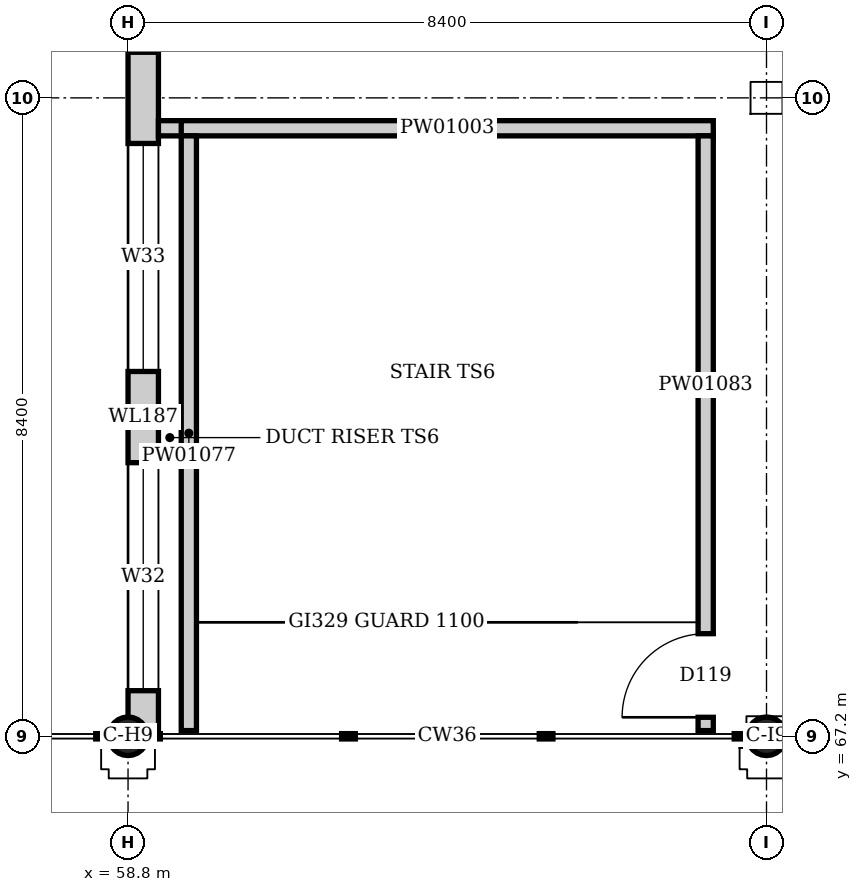
"""IFC4 building model, lengths in metres.
Left out: names, types, materials, properties, quantities, classifications, styles, units other than length and angle.
Written with IfcOpenShell. Run it as: python <this file> out.ifc"""

import sys

from ifc_helpers import new_model, si_unit, direction, frame, frame_2d, origin, origin_2d, place, context, subcontext, project, spatial, rectangle, hollow_circle, extrude, element, fill, save


model = new_model("IFC4")
c1 = context("Model", 3, precision=1e-05, world=origin(), true_north=direction((0.0, 1.0)))
c2 = subcontext(c1, "Body", "Model", "MODEL_VIEW")
j1 = project(units=[si_unit("LENGTHUNIT", "METRE"), si_unit("PLANEANGLEUNIT", "RADIAN")], contexts=[c1])
p1 = place(None, origin())
s1 = spatial("IfcSite", under=j1, at=p1, CompositionType="ELEMENT")
p2 = place(p1, origin())
s2 = spatial("IfcBuilding", under=s1, at=p2, CompositionType="ELEMENT")
p3 = place(p2, frame((0.0, 0.0, 6.0)))
s3 = spatial("IfcBuildingStorey", under=s2, at=p3, CompositionType="ELEMENT", Elevation=6.0)
for number, where, z_axis, x_axis in (
    (1, (58.8, 67.2, 0.0), (0.0, 0.0, 1.0), (1.0, 0.0, 0.0)),
    (2, (67.2, 67.2, 0.0), (0.0, 0.0, 1.0), (1.0, 0.0, 0.0)),
):
    element("IfcColumn", number, at=place(p3, frame(where, z_axis=z_axis, x_axis=x_axis)), inside=s3, PredefinedType="COLUMN", context=c2, shape_type="SweptSolid", body=[
        extrude(hollow_circle(Radius=0.254, WallThickness=0.016, at=origin_2d()), origin(), (0.0, 0.0, 1.0), 4.8),
    ])
p4 = place(p3, frame((59.0, 67.2, 0.0), z_axis=(0.0, 0.0, 1.0), x_axis=(0.0, 1.0, 0.0)))
e3 = element("IfcWall", 3, at=p4, inside=s3, PredefinedType="SOLIDWALL", context=c2, shape_type="SweptSolid", body=[
    extrude(rectangle(XDim=34.0, YDim=0.4, at=frame_2d((17.0, 0.0))), origin(), (0.0, 0.0, 1.0), 4.6),
])
p5 = place(p4, frame((0.6, 0.0, 0.6)))
e4 = element("IfcOpeningElement", 4, at=p5, cuts=e3, PredefinedType="OPENING", context=c2, shape_type="SweptSolid", body=[
    extrude(rectangle(XDim=3.0, YDim=2.7, at=frame_2d((1.5, 1.35))), frame((0.0, 0.21, 0.0), z_axis=(0.0, -1.0, 0.0), x_axis=(1.0, 0.0, 0.0)), (0.0, 0.0, 1.0), 0.42),
])
p6 = place(p4, frame((4.8, 0.0, 0.6)))
e5 = element("IfcOpeningElement", 5, at=p6, cuts=e3, PredefinedType="OPENING", context=c2, shape_type="SweptSolid", body=[
    extrude(rectangle(XDim=3.0, YDim=2.7, at=frame_2d((1.5, 1.35))), frame((0.0, 0.21, 0.0), z_axis=(0.0, -1.0, 0.0), x_axis=(1.0, 0.0, 0.0)), (0.0, 0.0, 1.0), 0.42),
])
p7 = place(p4, frame((9.0, 0.0, 0.6)))
e6 = element("IfcOpeningElement", 6, at=p7, cuts=e3, PredefinedType="OPENING", context=c2, shape_type="SweptSolid", body=[
    extrude(rectangle(XDim=3.0, YDim=2.7, at=frame_2d((1.5, 1.35))), frame((0.0, 0.21, 0.0), z_axis=(0.0, -1.0, 0.0), x_axis=(1.0, 0.0, 0.0)), (0.0, 0.0, 1.0), 0.42),
])
p8 = place(p4, frame((13.2, 0.0, 0.6)))
e7 = element("IfcOpeningElement", 7, at=p8, cuts=e3, PredefinedType="OPENING", context=c2, shape_type="SweptSolid", body=[
    extrude(rectangle(XDim=3.0, YDim=2.7, at=frame_2d((1.5, 1.35))), frame((0.0, 0.21, 0.0), z_axis=(0.0, -1.0, 0.0), x_axis=(1.0, 0.0, 0.0)), (0.0, 0.0, 1.0), 0.42),
])
p9 = place(p4, frame((17.4, 0.0, 0.6)))
e8 = element("IfcOpeningElement", 8, at=p9, cuts=e3, PredefinedType="OPENING", context=c2, shape_type="SweptSolid", body=[
    extrude(rectangle(XDim=3.0, YDim=2.7, at=frame_2d((1.5, 1.35))), frame((0.0, 0.21, 0.0), z_axis=(0.0, -1.0, 0.0), x_axis=(1.0, 0.0, 0.0)), (0.0, 0.0, 1.0), 0.42),
])
p10 = place(p4, frame((21.6, 0.0, 0.6)))
e9 = element("IfcOpeningElement", 9, at=p10, cuts=e3, PredefinedType="OPENING", context=c2, shape_type="SweptSolid", body=[
    extrude(rectangle(XDim=3.0, YDim=2.7, at=frame_2d((1.5, 1.35))), frame((0.0, 0.21, 0.0), z_axis=(0.0, -1.0, 0.0), x_axis=(1.0, 0.0, 0.0)), (0.0, 0.0, 1.0), 0.42),
])
p11 = place(p4, frame((25.8, 0.0, 0.6)))
e10 = element("IfcOpeningElement", 10, at=p11, cuts=e3, PredefinedType="OPENING", context=c2, shape_type="SweptSolid", body=[
    extrude(rectangle(XDim=3.0, YDim=2.7, at=frame_2d((1.5, 1.35))), frame((0.0, 0.21, 0.0), z_axis=(0.0, -1.0, 0.0), x_axis=(1.0, 0.0, 0.0)), (0.0, 0.0, 1.0), 0.42),
])
p12 = place(p4, frame((30.0, 0.0, 0.6)))
e11 = element("IfcOpeningElement", 11, at=p12, cuts=e3, PredefinedType="OPENING", context=c2, shape_type="SweptSolid", body=[
    extrude(rectangle(XDim=3.0, YDim=2.7, at=frame_2d((1.5, 1.35))), frame((0.0, 0.21, 0.0), z_axis=(0.0, -1.0, 0.0), x_axis=(1.0, 0.0, 0.0)), (0.0, 0.0, 1.0), 0.42),
])
p13 = place(p3, frame((59.2, 75.2, 0.0), z_axis=(0.0, 0.0, 1.0), x_axis=(1.0, 0.0, 0.0)))
e12 = element("IfcWall", 12, at=p13, inside=s3, PredefinedType="PARTITIONING", context=c2, shape_type="SweptSolid", body=[
    extrude(rectangle(XDim=0.5, YDim=0.2, at=frame_2d((0.25, 0.0))), origin(), (0.0, 0.0, 1.0), 4.6),
])
p14 = place(p3, frame((59.5, 75.2, 0.0), z_axis=(0.0, 0.0, 1.0), x_axis=(1.0, 0.0, 0.0)))
e13 = element("IfcWall", 13, at=p14, inside=s3, PredefinedType="PARTITIONING", context=c2, shape_type="SweptSolid", body=[
    extrude(rectangle(XDim=7.0, YDim=0.2, at=frame_2d((3.5, 0.0))), origin(), (0.0, 0.0, 1.0), 4.6),
])
p15 = place(p3, frame((59.6, 67.275, 0.0), z_axis=(0.0, 0.0, 1.0), x_axis=(0.0, 1.0, 0.0)))
e14 = element("IfcWall", 14, at=p15, inside=s3, PredefinedType="PARTITIONING", context=c2, shape_type="SweptSolid", body=[
    extrude(rectangle(XDim=7.825, YDim=0.2, at=frame_2d((3.913, 0.0))), origin(), (0.0, 0.0, 1.0), 4.6),
])
p16 = place(p3, frame((66.4, 67.275, 0.0), z_axis=(0.0, 0.0, 1.0), x_axis=(0.0, 1.0, 0.0)))
e15 = element("IfcWall", 15, at=p16, inside=s3, PredefinedType="PARTITIONING", context=c2, shape_type="SweptSolid", body=[
    extrude(rectangle(XDim=7.825, YDim=0.2, at=frame_2d((3.913, 0.0))), origin(), (0.0, 0.0, 1.0), 4.6),
])
p17 = place(p16, frame((0.175, 0.0, 0.0)))
e16 = element("IfcOpeningElement", 16, at=p17, cuts=e15, PredefinedType="OPENING", context=c2, shape_type="SweptSolid", body=[
    extrude(rectangle(XDim=1.1, YDim=2.4, at=frame_2d((0.55, 1.2))), frame((0.0, 0.11, 0.0), z_axis=(0.0, -1.0, 0.0), x_axis=(1.0, 0.0, 0.0)), (0.0, 0.0, 1.0), 0.22),
])
p18 = place(p5, origin())
e17 = element("IfcWindow", 17, at=p18, inside=s3, PartitioningType="SINGLE_PANEL", PredefinedType="WINDOW", context=c2, shape_type="SweptSolid", body=[
    extrude(rectangle(XDim=3.0, YDim=2.7, at=frame_2d((1.5, 1.35))), frame((0.0, 0.03, 0.0), z_axis=(0.0, -1.0, 0.0), x_axis=(1.0, 0.0, 0.0)), (0.0, 0.0, 1.0), 0.06),
])
fill(e4, e17)
p19 = place(p6, origin())
e18 = element("IfcWindow", 18, at=p19, inside=s3, PartitioningType="SINGLE_PANEL", PredefinedType="WINDOW", context=c2, shape_type="SweptSolid", body=[
    extrude(rectangle(XDim=3.0, YDim=2.7, at=frame_2d((1.5, 1.35))), frame((0.0, 0.03, 0.0), z_axis=(0.0, -1.0, 0.0), x_axis=(1.0, 0.0, 0.0)), (0.0, 0.0, 1.0), 0.06),
])
fill(e5, e18)
p20 = place(p17, origin())
e19 = element("IfcDoor", 19, at=p20, inside=s3, OperationType="SINGLE_SWING_LEFT", PredefinedType="DOOR", context=c2, shape_type="SweptSolid", body=[
    extrude(rectangle(XDim=1.1, YDim=2.4, at=frame_2d((0.55, 1.2))), frame((0.0, 0.025, 0.0), z_axis=(0.0, -1.0, 0.0), x_axis=(1.0, 0.0, 0.0)), (0.0, 0.0, 1.0), 0.05),
])
fill(e16, e19)
save(model, sys.argv[1])
